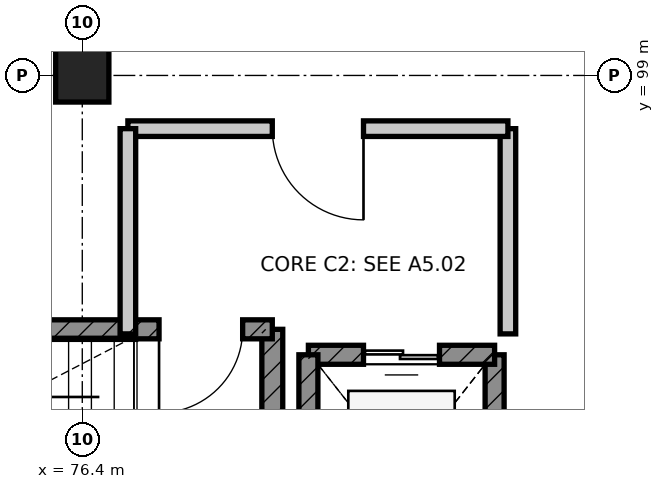
"""IFC4 building model, lengths in metres.
Left out: names, types, materials, properties, quantities, classifications, styles, units other than length and angle.
Written with IfcOpenShell. Run it as: python <this file> out.ifc"""

import sys

from ifc_helpers import new_model, si_unit, direction, frame, frame_2d, origin, origin_2d, place, context, subcontext, project, spatial, rectangle, extrude, element, fill, save


model = new_model("IFC4")
c1 = context("Model", 3, precision=1e-05, world=origin(), true_north=direction((0.0, 1.0)))
c2 = subcontext(c1, "Body", "Model", "MODEL_VIEW")
j1 = project(units=[si_unit("LENGTHUNIT", "METRE"), si_unit("PLANEANGLEUNIT", "RADIAN")], contexts=[c1])
p1 = place(None, origin())
s1 = spatial("IfcSite", under=j1, at=p1, CompositionType="ELEMENT")
p2 = place(p1, origin())
s2 = spatial("IfcBuilding", under=s1, at=p2, CompositionType="ELEMENT")
p3 = place(p2, frame((0.0, 0.0, 15.0)))
s3 = spatial("IfcBuildingStorey", under=s2, at=p3, CompositionType="ELEMENT", Elevation=15.0)
p4 = place(p3, frame((76.4, 99.0, 0.0), z_axis=(0.0, 0.0, 1.0), x_axis=(1.0, 0.0, 0.0)))
e1 = element("IfcColumn", 1, at=p4, inside=s3, PredefinedType="COLUMN", context=c2, shape_type="SweptSolid", body=[
    extrude(rectangle(XDim=0.7, YDim=0.7, at=origin_2d()), origin(), (0.0, 0.0, 1.0), 4.2),
])
p5 = place(p3, frame((78.9, 92.1, 0.0), z_axis=(0.0, 0.0, 1.0), x_axis=(0.0, 1.0, 0.0)))
e2 = element("IfcWall", 2, at=p5, inside=s3, PredefinedType="SHEAR", context=c2, shape_type="SweptSolid", body=[
    extrude(rectangle(XDim=3.56, YDim=0.275, at=frame_2d((1.78, 0.0))), origin(), (0.0, 0.0, 1.0), 3.94),
])
p6 = place(p3, frame((78.9, 95.66, 0.0), z_axis=(0.0, 0.0, 1.0), x_axis=(-1.0, 0.0, 0.0)))
e3 = element("IfcWall", 3, at=p6, inside=s3, PredefinedType="SHEAR", context=c2, shape_type="SweptSolid", body=[
    extrude(rectangle(XDim=8.4, YDim=0.25, at=frame_2d((4.2, 0.0))), origin(), (0.0, 0.0, 1.0), 3.94),
])
p7 = place(p6, frame((0.39, 0.0, 0.0)))
e4 = element("IfcOpeningElement", 4, at=p7, cuts=e3, PredefinedType="OPENING", context=c2, shape_type="SweptSolid", body=[
    extrude(rectangle(XDim=1.1, YDim=2.1, at=frame_2d((0.55, 1.05))), frame((0.0, 0.135, 0.0), z_axis=(0.0, -1.0, 0.0), x_axis=(1.0, 0.0, 0.0)), (0.0, 0.0, 1.0), 0.27),
])
p8 = place(p3, frame((81.825, 92.275, 0.0), z_axis=(0.0, 0.0, 1.0), x_axis=(0.0, 1.0, 0.0)))
e5 = element("IfcWall", 5, at=p8, inside=s3, PredefinedType="SHEAR", context=c2, shape_type="SweptSolid", body=[
    extrude(rectangle(XDim=3.05, YDim=0.25, at=frame_2d((1.525, 0.0))), origin(), (0.0, 0.0, 1.0), 3.94),
])
p9 = place(p3, frame((81.825, 95.325, 0.0), z_axis=(0.0, 0.0, 1.0), x_axis=(-1.0, 0.0, 0.0)))
e6 = element("IfcWall", 6, at=p9, inside=s3, PredefinedType="SHEAR", context=c2, shape_type="SweptSolid", body=[
    extrude(rectangle(XDim=2.45, YDim=0.25, at=frame_2d((1.225, 0.0))), origin(), (0.0, 0.0, 1.0), 3.94),
])
p10 = place(p9, frame((0.725, 0.0, 0.0)))
e7 = element("IfcOpeningElement", 7, at=p10, cuts=e6, PredefinedType="OPENING", context=c2, shape_type="SweptSolid", body=[
    extrude(rectangle(XDim=1.0, YDim=2.15, at=frame_2d((0.5, 1.075))), frame((0.0, 0.135, 0.0), z_axis=(0.0, -1.0, 0.0), x_axis=(1.0, 0.0, 0.0)), (0.0, 0.0, 1.0), 0.27),
])
p11 = place(p3, frame((79.375, 95.325, 0.0), z_axis=(0.0, 0.0, 1.0), x_axis=(0.0, -1.0, 0.0)))
e8 = element("IfcWall", 8, at=p11, inside=s3, PredefinedType="SHEAR", context=c2, shape_type="SweptSolid", body=[
    extrude(rectangle(XDim=3.05, YDim=0.25, at=frame_2d((1.525, 0.0))), origin(), (0.0, 0.0, 1.0), 3.94),
])
p12 = place(p3, frame((82.0, 95.6, 0.0), z_axis=(0.0, 0.0, 1.0), x_axis=(0.0, 1.0, 0.0)))
e9 = element("IfcWall", 9, at=p12, inside=s3, PredefinedType="PARTITIONING", context=c2, shape_type="SweptSolid", body=[
    extrude(rectangle(XDim=2.7, YDim=0.205, at=frame_2d((1.35, 0.0))), origin(), (0.0, 0.0, 1.0), 3.94),
])
p13 = place(p3, frame((82.0, 98.3, 0.0), z_axis=(0.0, 0.0, 1.0), x_axis=(-1.0, 0.0, 0.0)))
e10 = element("IfcWall", 10, at=p13, inside=s3, PredefinedType="PARTITIONING", context=c2, shape_type="SweptSolid", body=[
    extrude(rectangle(XDim=5.0, YDim=0.205, at=frame_2d((2.5, 0.0))), origin(), (0.0, 0.0, 1.0), 3.94),
])
p14 = place(p13, frame((1.9, 0.0, 0.0)))
e11 = element("IfcOpeningElement", 11, at=p14, cuts=e10, PredefinedType="OPENING", context=c2, shape_type="SweptSolid", body=[
    extrude(rectangle(XDim=1.2, YDim=2.1, at=frame_2d((0.6, 1.05))), frame((0.0, 0.113, 0.0), z_axis=(0.0, -1.0, 0.0), x_axis=(1.0, 0.0, 0.0)), (0.0, 0.0, 1.0), 0.225),
])
p15 = place(p3, frame((77.0, 98.3, 0.0), z_axis=(0.0, 0.0, 1.0), x_axis=(0.0, -1.0, 0.0)))
e12 = element("IfcWall", 12, at=p15, inside=s3, PredefinedType="PARTITIONING", context=c2, shape_type="SweptSolid", body=[
    extrude(rectangle(XDim=2.7, YDim=0.205, at=frame_2d((1.35, 0.0))), origin(), (0.0, 0.0, 1.0), 3.94),
])
p16 = place(p7, origin())
e13 = element("IfcDoor", 13, at=p16, inside=s3, OperationType="SINGLE_SWING_RIGHT", PredefinedType="DOOR", context=c2, shape_type="SweptSolid", body=[
    extrude(rectangle(XDim=1.1, YDim=2.1, at=frame_2d((0.55, 1.05))), frame((0.0, 0.025, 0.0), z_axis=(0.0, -1.0, 0.0), x_axis=(1.0, 0.0, 0.0)), (0.0, 0.0, 1.0), 0.05),
])
fill(e4, e13)
p17 = place(p10, origin())
e14 = element("IfcDoor", 14, at=p17, inside=s3, OperationType="DOUBLE_DOOR_SLIDING", PredefinedType="DOOR", context=c2, shape_type="SweptSolid", body=[
    extrude(rectangle(XDim=1.0, YDim=2.15, at=frame_2d((0.5, 1.075))), frame((0.0, 0.025, 0.0), z_axis=(0.0, -1.0, 0.0), x_axis=(1.0, 0.0, 0.0)), (0.0, 0.0, 1.0), 0.05),
])
fill(e7, e14)
p18 = place(p14, origin())
e15 = element("IfcDoor", 15, at=p18, inside=s3, OperationType="SINGLE_SWING_LEFT", PredefinedType="DOOR", context=c2, shape_type="SweptSolid", body=[
    extrude(rectangle(XDim=1.2, YDim=2.1, at=frame_2d((0.6, 1.05))), frame((0.0, 0.025, 0.0), z_axis=(0.0, -1.0, 0.0), x_axis=(1.0, 0.0, 0.0)), (0.0, 0.0, 1.0), 0.05),
])
fill(e11, e15)
save(model, sys.argv[1])
